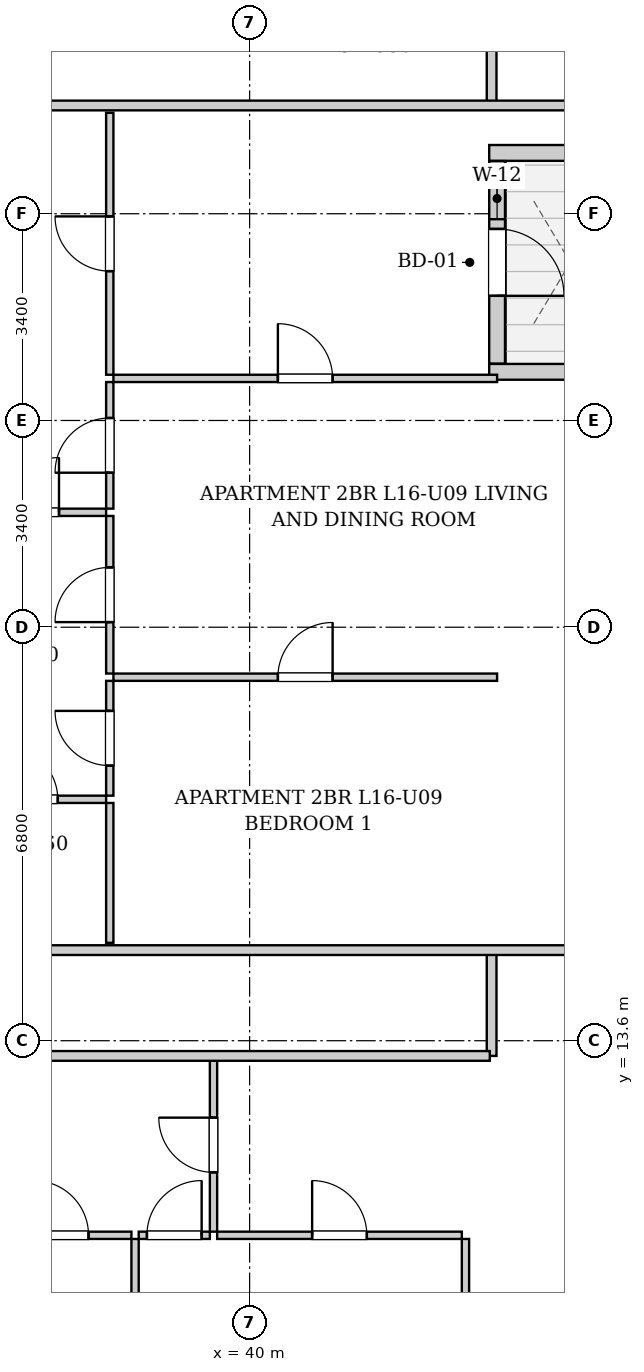
"""IFC4 building model, lengths in metres.
Left out: names, types, materials, properties, quantities, classifications, styles, units other than length and angle.
Written with IfcOpenShell. Run it as: python <this file> out.ifc"""

import sys

from ifc_helpers import new_model, si_unit, direction, frame, frame_2d, origin, place, context, subcontext, project, spatial, rectangle, extrude, element, fill, save


model = new_model("IFC4")
c1 = context("Model", 3, precision=1e-05, world=origin(), true_north=direction((0.0, 1.0)))
c2 = subcontext(c1, "Body", "Model", "MODEL_VIEW")
j1 = project(units=[si_unit("LENGTHUNIT", "METRE"), si_unit("PLANEANGLEUNIT", "RADIAN")], contexts=[c1])
p1 = place(None, origin())
s1 = spatial("IfcSite", under=j1, at=p1, CompositionType="ELEMENT")
p2 = place(p1, origin())
s2 = spatial("IfcBuilding", under=s1, at=p2, CompositionType="ELEMENT")
p3 = place(p2, frame((0.0, 0.0, 61.0)))
s3 = spatial("IfcBuildingStorey", under=s2, at=p3, CompositionType="ELEMENT", Elevation=61.0)
p4 = place(p3, frame((46.34, 28.2, 0.0), z_axis=(0.0, 0.0, 1.0), x_axis=(-1.0, 0.0, 0.0)))
e1 = element("IfcWall", 1, at=p4, inside=s3, PredefinedType="SOLIDWALL", context=c2, shape_type="SweptSolid", body=[
    extrude(rectangle(XDim=2.4, YDim=0.26, at=frame_2d((1.2, 0.0))), origin(), (0.0, 0.0, 1.0), 2.94),
])
p5 = place(p3, frame((44.07, 28.066, 0.0), z_axis=(0.0, 0.0, 1.0), x_axis=(0.0, -1.0, 0.0)))
e2 = element("IfcWall", 2, at=p5, inside=s3, PredefinedType="SOLIDWALL", context=c2, shape_type="SweptSolid", body=[
    extrude(rectangle(XDim=3.332, YDim=0.26, at=frame_2d((1.666, 0.0))), origin(), (0.0, 0.0, 1.0), 2.94),
])
p6 = place(p5, frame((1.116, 0.0, 0.0)))
e3 = element("IfcOpeningElement", 3, at=p6, cuts=e2, PredefinedType="OPENING", context=c2, shape_type="SweptSolid", body=[
    extrude(rectangle(XDim=1.1, YDim=2.0, at=frame_2d((0.55, 1.0))), frame((0.0, 0.14, 0.0), z_axis=(0.0, -1.0, 0.0), x_axis=(1.0, 0.0, 0.0)), (0.0, 0.0, 1.0), 0.28),
])
p7 = place(p5, frame((0.276, 0.0, 0.55)))
e4 = element("IfcOpeningElement", 4, at=p7, cuts=e2, PredefinedType="OPENING", context=c2, shape_type="SweptSolid", body=[
    extrude(rectangle(XDim=0.68, YDim=1.2, at=frame_2d((0.34, 0.6))), frame((0.0, 0.14, 0.0), z_axis=(0.0, -1.0, 0.0), x_axis=(1.0, 0.0, 0.0)), (0.0, 0.0, 1.0), 0.28),
])
p8 = place(p3, frame((43.94, 24.6, 0.0), z_axis=(0.0, 0.0, 1.0), x_axis=(1.0, 0.0, 0.0)))
e5 = element("IfcWall", 5, at=p8, inside=s3, PredefinedType="SOLIDWALL", context=c2, shape_type="SweptSolid", body=[
    extrude(rectangle(XDim=2.4, YDim=0.26, at=frame_2d((1.2, 0.0))), origin(), (0.0, 0.0, 1.0), 2.94),
])
for number, where, z_axis, x_axis in (
    (6, (43.98, 13.35, 0.0), (0.0, 0.0, 1.0), (0.0, 1.0, 0.0)),
    (7, (43.98, 28.98, 0.0), (0.0, 0.0, 1.0), (0.0, 1.0, 0.0)),
):
    element("IfcWall", number, at=place(p3, frame(where, z_axis=z_axis, x_axis=x_axis)), inside=s3, PredefinedType="PARTITIONING", context=c2, shape_type="SweptSolid", body=[
        extrude(rectangle(XDim=1.74, YDim=0.16, at=frame_2d((0.87, 0.0))), origin(), (0.0, 0.0, 1.0), 2.94),
    ])
for number, where, z_axis, x_axis in (
    (8, (35.11, 15.09, 0.0), (0.0, 0.0, 1.0), (1.0, 0.0, 0.0)),
    (9, (35.11, 28.98, 0.0), (0.0, 0.0, 1.0), (1.0, 0.0, 0.0)),
):
    element("IfcWall", number, at=place(p3, frame(where, z_axis=z_axis, x_axis=x_axis)), inside=s3, PredefinedType="PARTITIONING", context=c2, shape_type="SweptSolid", body=[
        extrude(rectangle(XDim=11.11, YDim=0.16, at=frame_2d((5.555, 0.0))), origin(), (0.0, 0.0, 1.0), 2.232),
    ])
p9 = place(p3, frame((39.406, 10.46, 0.0), z_axis=(0.0, 0.0, 1.0), x_axis=(0.0, 1.0, 0.0)))
e10 = element("IfcWall", 10, at=p9, inside=s3, PredefinedType="PARTITIONING", context=c2, shape_type="SweptSolid", body=[
    extrude(rectangle(XDim=2.85, YDim=0.12, at=frame_2d((1.425, 0.0))), origin(), (0.0, 0.0, 1.0), 2.94),
])
p10 = place(p9, frame((0.975, 0.0, 0.0)))
e11 = element("IfcOpeningElement", 11, at=p10, cuts=e10, PredefinedType="OPENING", context=c2, shape_type="SweptSolid", body=[
    extrude(rectangle(XDim=0.9, YDim=2.05, at=frame_2d((0.45, 1.025))), frame((0.0, 0.07, 0.0), z_axis=(0.0, -1.0, 0.0), x_axis=(1.0, 0.0, 0.0)), (0.0, 0.0, 1.0), 0.14),
])
p11 = place(p3, frame((35.746, 10.4, 0.0), z_axis=(0.0, 0.0, 1.0), x_axis=(1.0, 0.0, 0.0)))
e12 = element("IfcWall", 12, at=p11, inside=s3, PredefinedType="PARTITIONING", context=c2, shape_type="SweptSolid", body=[
    extrude(rectangle(XDim=2.31, YDim=0.12, at=frame_2d((1.155, 0.0))), origin(), (0.0, 0.0, 1.0), 2.94),
])
p12 = place(p11, frame((0.705, 0.0, 0.0)))
e13 = element("IfcOpeningElement", 13, at=p12, cuts=e12, PredefinedType="OPENING", context=c2, shape_type="SweptSolid", body=[
    extrude(rectangle(XDim=0.9, YDim=2.05, at=frame_2d((0.45, 1.025))), frame((0.0, 0.07, 0.0), z_axis=(0.0, -1.0, 0.0), x_axis=(1.0, 0.0, 0.0)), (0.0, 0.0, 1.0), 0.14),
])
p13 = place(p3, frame((38.176, 10.4, 0.0), z_axis=(0.0, 0.0, 1.0), x_axis=(1.0, 0.0, 0.0)))
e14 = element("IfcWall", 14, at=p13, inside=s3, PredefinedType="PARTITIONING", context=c2, shape_type="SweptSolid", body=[
    extrude(rectangle(XDim=1.17, YDim=0.12, at=frame_2d((0.585, 0.0))), origin(), (0.0, 0.0, 1.0), 2.94),
])
p14 = place(p13, frame((0.135, 0.0, 0.0)))
e15 = element("IfcOpeningElement", 15, at=p14, cuts=e14, PredefinedType="OPENING", context=c2, shape_type="SweptSolid", body=[
    extrude(rectangle(XDim=0.9, YDim=2.05, at=frame_2d((0.45, 1.025))), frame((0.0, 0.07, 0.0), z_axis=(0.0, -1.0, 0.0), x_axis=(1.0, 0.0, 0.0)), (0.0, 0.0, 1.0), 0.14),
])
p15 = place(p3, frame((39.466, 10.4, 0.0), z_axis=(0.0, 0.0, 1.0), x_axis=(1.0, 0.0, 0.0)))
e16 = element("IfcWall", 16, at=p15, inside=s3, PredefinedType="PARTITIONING", context=c2, shape_type="SweptSolid", body=[
    extrude(rectangle(XDim=4.024, YDim=0.12, at=frame_2d((2.012, 0.0))), origin(), (0.0, 0.0, 1.0), 2.94),
])
p16 = place(p15, frame((1.562, 0.0, 0.0)))
e17 = element("IfcOpeningElement", 17, at=p16, cuts=e16, PredefinedType="OPENING", context=c2, shape_type="SweptSolid", body=[
    extrude(rectangle(XDim=0.9, YDim=2.05, at=frame_2d((0.45, 1.025))), frame((0.0, 0.07, 0.0), z_axis=(0.0, -1.0, 0.0), x_axis=(1.0, 0.0, 0.0)), (0.0, 0.0, 1.0), 0.14),
])
p17 = place(p3, frame((38.116, 0.28, 0.0), z_axis=(0.0, 0.0, 1.0), x_axis=(0.0, 1.0, 0.0)))
e18 = element("IfcWall", 18, at=p17, inside=s3, PredefinedType="PARTITIONING", context=c2, shape_type="SweptSolid", body=[
    extrude(rectangle(XDim=10.06, YDim=0.12, at=frame_2d((5.03, 0.0))), origin(), (0.0, 0.0, 1.0), 2.94),
])
p18 = place(p17, frame((4.565, 0.0, 0.0)))
e19 = element("IfcOpeningElement", 19, at=p18, cuts=e18, PredefinedType="OPENING", context=c2, shape_type="SweptSolid", body=[
    extrude(rectangle(XDim=0.9, YDim=2.05, at=frame_2d((0.45, 1.025))), frame((0.0, 0.07, 0.0), z_axis=(0.0, -1.0, 0.0), x_axis=(1.0, 0.0, 0.0)), (0.0, 0.0, 1.0), 0.14),
])
p19 = place(p3, frame((43.55, 0.28, 0.0), z_axis=(0.0, 0.0, 1.0), x_axis=(0.0, 1.0, 0.0)))
e20 = element("IfcWall", 20, at=p19, inside=s3, PredefinedType="PARTITIONING", context=c2, shape_type="SweptSolid", body=[
    extrude(rectangle(XDim=10.06, YDim=0.12, at=frame_2d((5.03, 0.0))), origin(), (0.0, 0.0, 1.0), 2.94),
])
p20 = place(p19, frame((4.565, 0.0, 0.0)))
e21 = element("IfcOpeningElement", 21, at=p20, cuts=e20, PredefinedType="OPENING", context=c2, shape_type="SweptSolid", body=[
    extrude(rectangle(XDim=0.9, YDim=2.05, at=frame_2d((0.45, 1.025))), frame((0.0, 0.07, 0.0), z_axis=(0.0, -1.0, 0.0), x_axis=(1.0, 0.0, 0.0)), (0.0, 0.0, 1.0), 0.14),
])
p21 = place(p3, frame((35.19, 22.29, 0.0), z_axis=(0.0, 0.0, 1.0), x_axis=(1.0, 0.0, 0.0)))
e22 = element("IfcWall", 22, at=p21, inside=s3, PredefinedType="PARTITIONING", context=c2, shape_type="SweptSolid", body=[
    extrude(rectangle(XDim=2.45, YDim=0.12, at=frame_2d((1.225, 0.0))), origin(), (0.0, 0.0, 1.0), 2.94),
])
p22 = place(p21, frame((0.775, 0.0, 0.0)))
e23 = element("IfcOpeningElement", 23, at=p22, cuts=e22, PredefinedType="OPENING", context=c2, shape_type="SweptSolid", body=[
    extrude(rectangle(XDim=0.9, YDim=2.05, at=frame_2d((0.45, 1.025))), frame((0.0, 0.07, 0.0), z_axis=(0.0, -1.0, 0.0), x_axis=(1.0, 0.0, 0.0)), (0.0, 0.0, 1.0), 0.14),
])
p23 = place(p3, frame((37.7, 22.35, 0.0), z_axis=(0.0, 0.0, 1.0), x_axis=(0.0, 1.0, 0.0)))
e24 = element("IfcWall", 24, at=p23, inside=s3, PredefinedType="PARTITIONING", context=c2, shape_type="SweptSolid", body=[
    extrude(rectangle(XDim=2.082, YDim=0.12, at=frame_2d((1.041, 0.0))), origin(), (0.0, 0.0, 1.0), 2.94),
])
p24 = place(p23, frame((0.591, 0.0, 0.0)))
e25 = element("IfcOpeningElement", 25, at=p24, cuts=e24, PredefinedType="OPENING", context=c2, shape_type="SweptSolid", body=[
    extrude(rectangle(XDim=0.9, YDim=2.05, at=frame_2d((0.45, 1.025))), frame((0.0, 0.07, 0.0), z_axis=(0.0, -1.0, 0.0), x_axis=(1.0, 0.0, 0.0)), (0.0, 0.0, 1.0), 0.14),
])
p25 = place(p3, frame((37.7, 24.552, 0.0), z_axis=(0.0, 0.0, 1.0), x_axis=(0.0, 1.0, 0.0)))
e26 = element("IfcWall", 26, at=p25, inside=s3, PredefinedType="PARTITIONING", context=c2, shape_type="SweptSolid", body=[
    extrude(rectangle(XDim=4.308, YDim=0.12, at=frame_2d((2.154, 0.0))), origin(), (0.0, 0.0, 1.0), 2.94),
])
p26 = place(p25, frame((1.704, 0.0, 0.0)))
e27 = element("IfcOpeningElement", 27, at=p26, cuts=e26, PredefinedType="OPENING", context=c2, shape_type="SweptSolid", body=[
    extrude(rectangle(XDim=0.9, YDim=2.05, at=frame_2d((0.45, 1.025))), frame((0.0, 0.07, 0.0), z_axis=(0.0, -1.0, 0.0), x_axis=(1.0, 0.0, 0.0)), (0.0, 0.0, 1.0), 0.14),
])
p27 = place(p3, frame((35.19, 17.57, 0.0), z_axis=(0.0, 0.0, 1.0), x_axis=(1.0, 0.0, 0.0)))
e28 = element("IfcWall", 28, at=p27, inside=s3, PredefinedType="PARTITIONING", context=c2, shape_type="SweptSolid", body=[
    extrude(rectangle(XDim=2.45, YDim=0.12, at=frame_2d((1.225, 0.0))), origin(), (0.0, 0.0, 1.0), 2.94),
])
p28 = place(p27, frame((0.795, 0.0, 0.0)))
e29 = element("IfcOpeningElement", 29, at=p28, cuts=e28, PredefinedType="OPENING", context=c2, shape_type="SweptSolid", body=[
    extrude(rectangle(XDim=0.86, YDim=2.05, at=frame_2d((0.43, 1.025))), frame((0.0, 0.07, 0.0), z_axis=(0.0, -1.0, 0.0), x_axis=(1.0, 0.0, 0.0)), (0.0, 0.0, 1.0), 0.14),
])
p29 = place(p3, frame((37.7, 15.21, 0.0), z_axis=(0.0, 0.0, 1.0), x_axis=(0.0, 1.0, 0.0)))
e30 = element("IfcWall", 30, at=p29, inside=s3, PredefinedType="PARTITIONING", context=c2, shape_type="SweptSolid", body=[
    extrude(rectangle(XDim=2.3, YDim=0.12, at=frame_2d((1.15, 0.0))), origin(), (0.0, 0.0, 1.0), 2.94),
])
p30 = place(p3, frame((37.7, 17.63, 0.0), z_axis=(0.0, 0.0, 1.0), x_axis=(0.0, 1.0, 0.0)))
e31 = element("IfcWall", 31, at=p30, inside=s3, PredefinedType="PARTITIONING", context=c2, shape_type="SweptSolid", body=[
    extrude(rectangle(XDim=1.888, YDim=0.12, at=frame_2d((0.944, 0.0))), origin(), (0.0, 0.0, 1.0), 2.94),
])
p31 = place(p30, frame((0.494, 0.0, 0.0)))
e32 = element("IfcOpeningElement", 32, at=p31, cuts=e31, PredefinedType="OPENING", context=c2, shape_type="SweptSolid", body=[
    extrude(rectangle(XDim=0.9, YDim=2.05, at=frame_2d((0.45, 1.025))), frame((0.0, 0.07, 0.0), z_axis=(0.0, -1.0, 0.0), x_axis=(1.0, 0.0, 0.0)), (0.0, 0.0, 1.0), 0.14),
])
p32 = place(p3, frame((37.7, 19.638, 0.0), z_axis=(0.0, 0.0, 1.0), x_axis=(0.0, 1.0, 0.0)))
e33 = element("IfcWall", 33, at=p32, inside=s3, PredefinedType="PARTITIONING", context=c2, shape_type="SweptSolid", body=[
    extrude(rectangle(XDim=2.592, YDim=0.12, at=frame_2d((1.296, 0.0))), origin(), (0.0, 0.0, 1.0), 2.94),
])
p33 = place(p32, frame((0.846, 0.0, 0.0)))
e34 = element("IfcOpeningElement", 34, at=p33, cuts=e33, PredefinedType="OPENING", context=c2, shape_type="SweptSolid", body=[
    extrude(rectangle(XDim=0.9, YDim=2.05, at=frame_2d((0.45, 1.025))), frame((0.0, 0.07, 0.0), z_axis=(0.0, -1.0, 0.0), x_axis=(1.0, 0.0, 0.0)), (0.0, 0.0, 1.0), 0.14),
])
p34 = place(p3, frame((37.76, 19.578, 0.0), z_axis=(0.0, 0.0, 1.0), x_axis=(1.0, 0.0, 0.0)))
e35 = element("IfcWall", 35, at=p34, inside=s3, PredefinedType="PARTITIONING", context=c2, shape_type="SweptSolid", body=[
    extrude(rectangle(XDim=6.31, YDim=0.12, at=frame_2d((3.155, 0.0))), origin(), (0.0, 0.0, 1.0), 2.94),
])
p35 = place(p34, frame((2.705, 0.0, 0.0)))
e36 = element("IfcOpeningElement", 36, at=p35, cuts=e35, PredefinedType="OPENING", context=c2, shape_type="SweptSolid", body=[
    extrude(rectangle(XDim=0.9, YDim=2.05, at=frame_2d((0.45, 1.025))), frame((0.0, 0.07, 0.0), z_axis=(0.0, -1.0, 0.0), x_axis=(1.0, 0.0, 0.0)), (0.0, 0.0, 1.0), 0.14),
])
p36 = place(p3, frame((37.76, 24.492, 0.0), z_axis=(0.0, 0.0, 1.0), x_axis=(1.0, 0.0, 0.0)))
e37 = element("IfcWall", 37, at=p36, inside=s3, PredefinedType="PARTITIONING", context=c2, shape_type="SweptSolid", body=[
    extrude(rectangle(XDim=6.31, YDim=0.12, at=frame_2d((3.155, 0.0))), origin(), (0.0, 0.0, 1.0), 2.508),
])
p37 = place(p36, frame((2.705, 0.0, 0.0)))
e38 = element("IfcOpeningElement", 38, at=p37, cuts=e37, PredefinedType="OPENING", context=c2, shape_type="SweptSolid", body=[
    extrude(rectangle(XDim=0.9, YDim=2.05, at=frame_2d((0.45, 1.025))), frame((0.0, 0.07, 0.0), z_axis=(0.0, -1.0, 0.0), x_axis=(1.0, 0.0, 0.0)), (0.0, 0.0, 1.0), 0.14),
])
p38 = place(p3, frame((10.05, 13.35, 0.0), z_axis=(0.0, 0.0, 1.0), x_axis=(1.0, 0.0, 0.0)))
e39 = element("IfcWall", 39, at=p38, inside=s3, PredefinedType="PARTITIONING", context=c2, shape_type="SweptSolid", body=[
    extrude(rectangle(XDim=33.9, YDim=0.16, at=frame_2d((16.95, 0.0))), origin(), (0.0, 0.0, 1.0), 2.94),
])
p39 = place(p38, frame((3.8, 0.0, 0.0)))
e40 = element("IfcOpeningElement", 40, at=p39, cuts=e39, PredefinedType="OPENING", context=c2, shape_type="SweptSolid", body=[
    extrude(rectangle(XDim=0.95, YDim=2.1, at=frame_2d((0.475, 1.05))), frame((0.0, 0.09, 0.0), z_axis=(0.0, -1.0, 0.0), x_axis=(1.0, 0.0, 0.0)), (0.0, 0.0, 1.0), 0.18),
])
p40 = place(p38, frame((13.071, 0.0, 0.0)))
e41 = element("IfcOpeningElement", 41, at=p40, cuts=e39, PredefinedType="OPENING", context=c2, shape_type="SweptSolid", body=[
    extrude(rectangle(XDim=0.95, YDim=2.1, at=frame_2d((0.475, 1.05))), frame((0.0, 0.09, 0.0), z_axis=(0.0, -1.0, 0.0), x_axis=(1.0, 0.0, 0.0)), (0.0, 0.0, 1.0), 0.18),
])
p41 = place(p10, origin())
e42 = element("IfcDoor", 42, at=p41, inside=s3, OperationType="SINGLE_SWING_RIGHT", PredefinedType="DOOR", context=c2, shape_type="SweptSolid", body=[
    extrude(rectangle(XDim=0.9, YDim=2.05, at=frame_2d((0.45, 1.025))), frame((0.0, 0.025, 0.0), z_axis=(0.0, -1.0, 0.0), x_axis=(1.0, 0.0, 0.0)), (0.0, 0.0, 1.0), 0.05),
])
fill(e11, e42)
p42 = place(p12, origin())
e43 = element("IfcDoor", 43, at=p42, inside=s3, OperationType="SINGLE_SWING_LEFT", PredefinedType="DOOR", context=c2, shape_type="SweptSolid", body=[
    extrude(rectangle(XDim=0.9, YDim=2.05, at=frame_2d((0.45, 1.025))), frame((0.0, 0.025, 0.0), z_axis=(0.0, -1.0, 0.0), x_axis=(1.0, 0.0, 0.0)), (0.0, 0.0, 1.0), 0.05),
])
fill(e13, e43)
p43 = place(p14, origin())
e44 = element("IfcDoor", 44, at=p43, inside=s3, OperationType="SINGLE_SWING_RIGHT", PredefinedType="DOOR", context=c2, shape_type="SweptSolid", body=[
    extrude(rectangle(XDim=0.9, YDim=2.05, at=frame_2d((0.45, 1.025))), frame((0.0, 0.025, 0.0), z_axis=(0.0, -1.0, 0.0), x_axis=(1.0, 0.0, 0.0)), (0.0, 0.0, 1.0), 0.05),
])
fill(e15, e44)
p44 = place(p16, origin())
e45 = element("IfcDoor", 45, at=p44, inside=s3, OperationType="SINGLE_SWING_LEFT", PredefinedType="DOOR", context=c2, shape_type="SweptSolid", body=[
    extrude(rectangle(XDim=0.9, YDim=2.05, at=frame_2d((0.45, 1.025))), frame((0.0, 0.025, 0.0), z_axis=(0.0, -1.0, 0.0), x_axis=(1.0, 0.0, 0.0)), (0.0, 0.0, 1.0), 0.05),
])
fill(e17, e45)
p45 = place(p22, origin())
e46 = element("IfcDoor", 46, at=p45, inside=s3, OperationType="SINGLE_SWING_RIGHT", PredefinedType="DOOR", context=c2, shape_type="SweptSolid", body=[
    extrude(rectangle(XDim=0.9, YDim=2.05, at=frame_2d((0.45, 1.025))), frame((0.0, 0.025, 0.0), z_axis=(0.0, -1.0, 0.0), x_axis=(1.0, 0.0, 0.0)), (0.0, 0.0, 1.0), 0.05),
])
fill(e23, e46)
p46 = place(p24, origin())
e47 = element("IfcDoor", 47, at=p46, inside=s3, OperationType="SINGLE_SWING_LEFT", PredefinedType="DOOR", context=c2, shape_type="SweptSolid", body=[
    extrude(rectangle(XDim=0.9, YDim=2.05, at=frame_2d((0.45, 1.025))), frame((0.0, 0.025, 0.0), z_axis=(0.0, -1.0, 0.0), x_axis=(1.0, 0.0, 0.0)), (0.0, 0.0, 1.0), 0.05),
])
fill(e25, e47)
p47 = place(p26, origin())
e48 = element("IfcDoor", 48, at=p47, inside=s3, OperationType="SINGLE_SWING_RIGHT", PredefinedType="DOOR", context=c2, shape_type="SweptSolid", body=[
    extrude(rectangle(XDim=0.9, YDim=2.05, at=frame_2d((0.45, 1.025))), frame((0.0, 0.025, 0.0), z_axis=(0.0, -1.0, 0.0), x_axis=(1.0, 0.0, 0.0)), (0.0, 0.0, 1.0), 0.05),
])
fill(e27, e48)
p48 = place(p28, origin())
e49 = element("IfcDoor", 49, at=p48, inside=s3, OperationType="SINGLE_SWING_LEFT", PredefinedType="DOOR", context=c2, shape_type="SweptSolid", body=[
    extrude(rectangle(XDim=0.86, YDim=2.05, at=frame_2d((0.43, 1.025))), frame((0.0, 0.025, 0.0), z_axis=(0.0, -1.0, 0.0), x_axis=(1.0, 0.0, 0.0)), (0.0, 0.0, 1.0), 0.05),
])
fill(e29, e49)
p49 = place(p31, origin())
e50 = element("IfcDoor", 50, at=p49, inside=s3, OperationType="SINGLE_SWING_RIGHT", PredefinedType="DOOR", context=c2, shape_type="SweptSolid", body=[
    extrude(rectangle(XDim=0.9, YDim=2.05, at=frame_2d((0.45, 1.025))), frame((0.0, 0.025, 0.0), z_axis=(0.0, -1.0, 0.0), x_axis=(1.0, 0.0, 0.0)), (0.0, 0.0, 1.0), 0.05),
])
fill(e32, e50)
p50 = place(p33, origin())
e51 = element("IfcDoor", 51, at=p50, inside=s3, OperationType="SINGLE_SWING_LEFT", PredefinedType="DOOR", context=c2, shape_type="SweptSolid", body=[
    extrude(rectangle(XDim=0.9, YDim=2.05, at=frame_2d((0.45, 1.025))), frame((0.0, 0.025, 0.0), z_axis=(0.0, -1.0, 0.0), x_axis=(1.0, 0.0, 0.0)), (0.0, 0.0, 1.0), 0.05),
])
fill(e34, e51)
p51 = place(p35, origin())
e52 = element("IfcDoor", 52, at=p51, inside=s3, OperationType="SINGLE_SWING_RIGHT", PredefinedType="DOOR", context=c2, shape_type="SweptSolid", body=[
    extrude(rectangle(XDim=0.9, YDim=2.05, at=frame_2d((0.45, 1.025))), frame((0.0, 0.025, 0.0), z_axis=(0.0, -1.0, 0.0), x_axis=(1.0, 0.0, 0.0)), (0.0, 0.0, 1.0), 0.05),
])
fill(e36, e52)
p52 = place(p37, origin())
e53 = element("IfcDoor", 53, at=p52, inside=s3, OperationType="SINGLE_SWING_LEFT", PredefinedType="DOOR", context=c2, shape_type="SweptSolid", body=[
    extrude(rectangle(XDim=0.9, YDim=2.05, at=frame_2d((0.45, 1.025))), frame((0.0, 0.025, 0.0), z_axis=(0.0, -1.0, 0.0), x_axis=(1.0, 0.0, 0.0)), (0.0, 0.0, 1.0), 0.05),
])
fill(e38, e53)
p53 = place(p6, origin())
e54 = element("IfcDoor", 54, at=p53, inside=s3, OperationType="SINGLE_SWING_RIGHT", PredefinedType="DOOR", context=c2, shape_type="SweptSolid", body=[
    extrude(rectangle(XDim=1.1, YDim=2.0, at=frame_2d((0.55, 1.0))), frame((0.0, 0.025, 0.0), z_axis=(0.0, -1.0, 0.0), x_axis=(1.0, 0.0, 0.0)), (0.0, 0.0, 1.0), 0.05),
])
fill(e3, e54)
p54 = place(p7, origin())
e55 = element("IfcWindow", 55, at=p54, inside=s3, PartitioningType="SINGLE_PANEL", PredefinedType="WINDOW", context=c2, shape_type="SweptSolid", body=[
    extrude(rectangle(XDim=0.68, YDim=1.2, at=frame_2d((0.34, 0.6))), frame((0.0, 0.03, 0.0), z_axis=(0.0, -1.0, 0.0), x_axis=(1.0, 0.0, 0.0)), (0.0, 0.0, 1.0), 0.06),
])
fill(e4, e55)
save(model, sys.argv[1])
